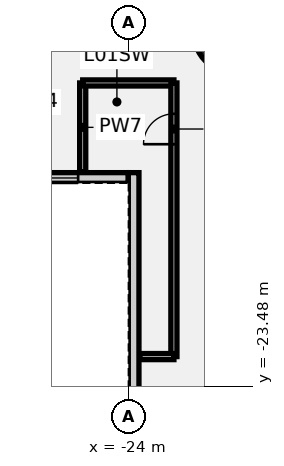
"""IFC4 building model, lengths in metres.
Left out: names, types, materials, properties, quantities, classifications, styles, units other than length and angle.
Written with IfcOpenShell. Run it as: python <this file> out.ifc"""

import sys

from ifc_helpers import new_model, si_unit, direction, frame, frame_2d, origin, origin_2d, place, context, subcontext, project, spatial, rectangle, circle, extrude, element, fill, save


model = new_model("IFC4")
c1 = context("Model", 3, precision=1e-05, world=origin(), true_north=direction((0.0, 1.0)))
c2 = subcontext(c1, "Body", "Model", "MODEL_VIEW")
j1 = project(units=[si_unit("LENGTHUNIT", "METRE"), si_unit("PLANEANGLEUNIT", "RADIAN")], contexts=[c1])
p1 = place(None, origin())
s1 = spatial("IfcSite", under=j1, at=p1, CompositionType="ELEMENT")
p2 = place(p1, origin())
s2 = spatial("IfcBuilding", under=s1, at=p2, CompositionType="ELEMENT")
p3 = place(p2, frame((0.0, 0.0, 9.0)))
s3 = spatial("IfcBuildingStorey", under=s2, at=p3, CompositionType="ELEMENT", Elevation=9.0)
p4 = place(p3, frame((-20.543, -11.86, -0.5), z_axis=(0.0, 0.0, 1.0), x_axis=(1.0, 0.0, 0.0)))
e1 = element("IfcColumn", 1, at=p4, inside=s3, PredefinedType="COLUMN", context=c2, shape_type="SweptSolid", body=[
    extrude(circle(Radius=1.3, at=origin_2d()), origin(), (0.0, 0.0, 1.0), 6.0),
])
p5 = place(p3, frame((-25.5, -16.42, 0.0), z_axis=(0.0, 0.0, 1.0), x_axis=(0.0, 1.0, 0.0)))
e2 = element("IfcWall", 2, at=p5, inside=s3, PredefinedType="PARTITIONING", context=c2, shape_type="SweptSolid", body=[
    extrude(rectangle(XDim=2.92, YDim=0.2, at=frame_2d((1.46, 0.0))), origin(), (0.0, 0.0, 1.0), 5.5),
])
p6 = place(p3, frame((-25.5, -13.5, 0.0), z_axis=(0.0, 0.0, 1.0), x_axis=(1.0, 0.0, 0.0)))
e3 = element("IfcWall", 3, at=p6, inside=s3, PredefinedType="PARTITIONING", context=c2, shape_type="SweptSolid", body=[
    extrude(rectangle(XDim=3.0, YDim=0.2, at=frame_2d((1.5, 0.0))), origin(), (0.0, 0.0, 1.0), 5.5),
])
p7 = place(p3, frame((-22.5, -22.5, 0.0), z_axis=(0.0, 0.0, 1.0), x_axis=(0.0, 1.0, 0.0)))
e4 = element("IfcWall", 4, at=p7, inside=s3, PredefinedType="PARTITIONING", context=c2, shape_type="SweptSolid", body=[
    extrude(rectangle(XDim=9.0, YDim=0.2, at=frame_2d((4.5, 0.0))), origin(), (0.0, 0.0, 1.0), 5.5),
])
p8 = place(p7, frame((6.985, 0.0, 0.0)))
e5 = element("IfcOpeningElement", 5, at=p8, cuts=e4, PredefinedType="OPENING", context=c2, shape_type="SweptSolid", body=[
    extrude(rectangle(XDim=1.0, YDim=2.1, at=frame_2d((0.5, 1.05))), frame((0.0, 0.11, 0.0), z_axis=(0.0, -1.0, 0.0), x_axis=(1.0, 0.0, 0.0)), (0.0, 0.0, 1.0), 0.22),
])
p9 = place(p3, frame((-23.62, -22.5, 0.0), z_axis=(0.0, 0.0, 1.0), x_axis=(1.0, 0.0, 0.0)))
e6 = element("IfcWall", 6, at=p9, inside=s3, PredefinedType="PARTITIONING", context=c2, shape_type="SweptSolid", body=[
    extrude(rectangle(XDim=1.12, YDim=0.2, at=frame_2d((0.56, 0.0))), origin(), (0.0, 0.0, 1.0), 5.5),
])
p10 = place(p3, frame((-42.0, -16.625, 0.0), z_axis=(0.0, 0.0, 1.0), x_axis=(1.0, 0.0, 0.0)))
e7 = element("IfcWall", 7, at=p10, inside=s3, PredefinedType="SOLIDWALL", context=c2, shape_type="SweptSolid", body=[
    extrude(rectangle(XDim=18.0, YDim=0.35, at=frame_2d((9.0, 0.0))), origin(), (0.0, 0.0, 1.0), 5.5),
])
p11 = place(p10, frame((13.95, 0.0, 1.0)))
e8 = element("IfcOpeningElement", 8, at=p11, cuts=e7, PredefinedType="OPENING", context=c2, shape_type="SweptSolid", body=[
    extrude(rectangle(XDim=2.4, YDim=1.8, at=frame_2d((1.2, 0.9))), frame((0.0, 0.185, 0.0), z_axis=(0.0, -1.0, 0.0), x_axis=(1.0, 0.0, 0.0)), (0.0, 0.0, 1.0), 0.37),
])
p12 = place(p3, frame((-23.825, -43.85, 0.0), z_axis=(0.0, 0.0, 1.0), x_axis=(0.0, 1.0, 0.0)))
e9 = element("IfcWall", 9, at=p12, inside=s3, PredefinedType="SOLIDWALL", context=c2, shape_type="SweptSolid", body=[
    extrude(rectangle(XDim=27.4, YDim=0.35, at=frame_2d((13.7, 0.0))), origin(), (0.0, 0.0, 1.0), 5.5),
])
p13 = place(p12, frame((14.9, 0.0, 1.0)))
e10 = element("IfcOpeningElement", 10, at=p13, cuts=e9, PredefinedType="OPENING", context=c2, shape_type="SweptSolid", body=[
    extrude(rectangle(XDim=2.4, YDim=1.8, at=frame_2d((1.2, 0.9))), frame((0.0, 0.185, 0.0), z_axis=(0.0, -1.0, 0.0), x_axis=(1.0, 0.0, 0.0)), (0.0, 0.0, 1.0), 0.37),
])
p14 = place(p8, origin())
e11 = element("IfcDoor", 11, at=p14, inside=s3, OperationType="SINGLE_SWING_RIGHT", PredefinedType="DOOR", context=c2, shape_type="SweptSolid", body=[
    extrude(rectangle(XDim=1.0, YDim=2.1, at=frame_2d((0.5, 1.05))), frame((0.0, 0.025, 0.0), z_axis=(0.0, -1.0, 0.0), x_axis=(1.0, 0.0, 0.0)), (0.0, 0.0, 1.0), 0.05),
])
fill(e5, e11)
p15 = place(p11, origin())
e12 = element("IfcWindow", 12, at=p15, inside=s3, PartitioningType="SINGLE_PANEL", PredefinedType="WINDOW", context=c2, shape_type="SweptSolid", body=[
    extrude(rectangle(XDim=2.4, YDim=1.8, at=frame_2d((1.2, 0.9))), frame((0.0, 0.03, 0.0), z_axis=(0.0, -1.0, 0.0), x_axis=(1.0, 0.0, 0.0)), (0.0, 0.0, 1.0), 0.06),
])
fill(e8, e12)
save(model, sys.argv[1])
